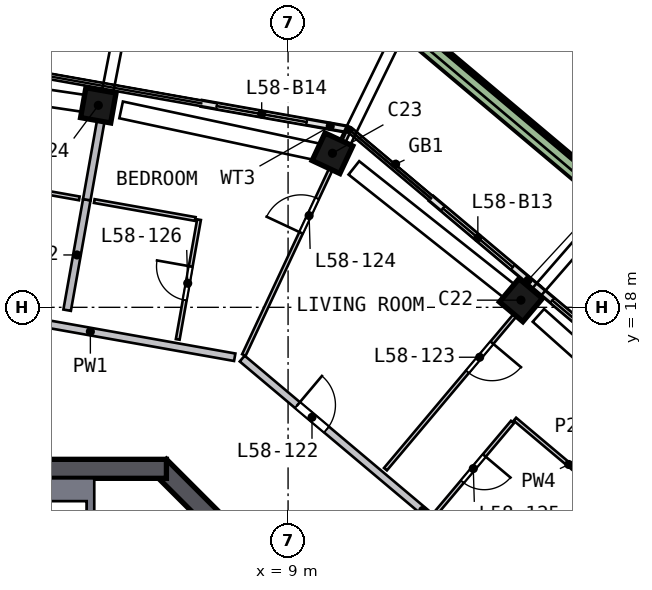
"""IFC4 building model, lengths in metres.
Left out: names, types, materials, properties, quantities, classifications, styles, units other than length and angle.
Written with IfcOpenShell. Run it as: python <this file> out.ifc"""

import sys

from ifc_helpers import new_model, si_unit, direction, frame, frame_2d, origin, origin_2d, place, context, subcontext, project, spatial, polyline, rectangle, outline, extrude, element, fill, save


model = new_model("IFC4")
c1 = context("Model", 3, precision=1e-05, world=origin(), true_north=direction((0.0, 1.0)))
c2 = subcontext(c1, "Body", "Model", "MODEL_VIEW")
j1 = project(units=[si_unit("LENGTHUNIT", "METRE"), si_unit("PLANEANGLEUNIT", "RADIAN")], contexts=[c1])
p1 = place(None, origin())
s1 = spatial("IfcSite", under=j1, at=p1, CompositionType="ELEMENT")
p2 = place(p1, origin())
s2 = spatial("IfcBuilding", under=s1, at=p2, CompositionType="ELEMENT")
p3 = place(p2, frame((0.0, 0.0, 237.5)))
s3 = spatial("IfcBuildingStorey", under=s2, at=p3, CompositionType="ELEMENT", Elevation=237.5)
p4 = place(p3, frame((15.233, 18.102, 0.0), z_axis=(-0.086770351, 0.071788967, 0.99363839), x_axis=(-0.760182292, 0.639875796, -0.112613711)))
e1 = element("IfcColumn", 1, at=p4, inside=s3, PredefinedType="COLUMN", context=c2, shape_type="SweptSolid", body=[
    extrude(rectangle(XDim=0.8, YDim=0.8, at=origin_2d()), origin(), (0.0, 0.0, 1.0), 3.21),
])
p5 = place(p3, frame((10.294, 21.996, 0.0), z_axis=(-0.104987311, 0.048046329, 0.993312244), x_axis=(0.899680967, -0.421003944, 0.115454914)))
e2 = element("IfcColumn", 2, at=p5, inside=s3, PredefinedType="COLUMN", context=c2, shape_type="SweptSolid", body=[
    extrude(rectangle(XDim=0.8, YDim=0.8, at=origin_2d()), origin(), (0.0, 0.0, 1.0), 3.211),
])
p6 = place(p3, frame((4.141, 23.293, 0.0), z_axis=(-0.111029677, 0.018783788, 0.993639562), x_axis=(-0.978276827, 0.174054393, -0.112603368)))
e3 = element("IfcColumn", 3, at=p6, inside=s3, PredefinedType="COLUMN", context=c2, shape_type="SweptSolid", body=[
    extrude(rectangle(XDim=0.8, YDim=0.8, at=origin_2d()), origin(), (0.0, 0.0, 1.0), 3.21),
])
p7 = place(p3, frame((13.823, 5.622, 0.0), z_axis=(0.0, 0.0, 1.0), x_axis=(-0.707106781, 0.707106781, 0.0)))
e4 = element("IfcWall", 4, at=p7, inside=s3, PredefinedType="SHEAR", context=c2, shape_type="SweptSolid", body=[
    extrude(rectangle(XDim=11.598, YDim=0.5, at=frame_2d((5.799, 0.0))), origin(), (0.0, 0.0, 1.0), 3.5),
])
p8 = place(p7, frame((2.099, 0.0, 0.0)))
e5 = element("IfcOpeningElement", 5, at=p8, cuts=e4, PredefinedType="OPENING", context=c2, shape_type="SweptSolid", body=[
    extrude(rectangle(XDim=1.2, YDim=2.1, at=frame_2d((0.6, 1.05))), frame((0.0, 0.26, 0.0), z_axis=(0.0, -1.0, 0.0), x_axis=(1.0, 0.0, 0.0)), (0.0, 0.0, 1.0), 0.52),
])
p9 = place(p3, frame((5.799, 13.75, 0.0), z_axis=(0.0, 0.0, 1.0), x_axis=(-1.0, 0.0, 0.0)))
e6 = element("IfcWall", 6, at=p9, inside=s3, PredefinedType="SHEAR", context=c2, shape_type="SweptSolid", body=[
    extrude(rectangle(XDim=11.598, YDim=0.5, at=frame_2d((5.799, 0.0))), origin(), (0.0, 0.0, 1.0), 3.5),
])
p10 = place(p9, frame((4.899, 0.0, 0.0)))
e7 = element("IfcOpeningElement", 7, at=p10, cuts=e6, PredefinedType="OPENING", context=c2, shape_type="SweptSolid", body=[
    extrude(rectangle(XDim=1.8, YDim=2.1, at=frame_2d((0.9, 1.05))), frame((0.0, 0.26, 0.0), z_axis=(0.0, -1.0, 0.0), x_axis=(1.0, 0.0, 0.0)), (0.0, 0.0, 1.0), 0.52),
])
p11 = place(p3, frame((18.095, 16.379, 0.0), z_axis=(0.0, 0.0, 1.0), x_axis=(-0.765168231, 0.643830395, 0.0)))
e8 = element("IfcWall", 8, at=p11, inside=s3, PredefinedType="SOLIDWALL", context=c2, shape_type="SweptSolid", body=[
    extrude(rectangle(XDim=3.3, YDim=0.15, at=frame_2d((1.65, 0.0))), origin(), (0.0, 0.0, 1.0), 2.525),
])
p12 = place(p11, frame((0.4, 0.0, 0.0)))
e9 = element("IfcOpeningElement", 9, at=p12, cuts=e8, PredefinedType="OPENING", context=c2, shape_type="SweptSolid", body=[
    extrude(rectangle(XDim=2.4, YDim=2.4, at=frame_2d((1.2, 1.2))), frame((0.0, 0.085, 0.0), z_axis=(0.0, -1.0, 0.0), x_axis=(1.0, 0.0, 0.0)), (0.0, 0.0, 1.0), 0.17),
])
p13 = place(p3, frame((15.571, 18.504, 0.0), z_axis=(0.0, 0.0, 1.0), x_axis=(-0.765118664, 0.643889299, 0.0)))
e10 = element("IfcWall", 10, at=p13, inside=s3, PredefinedType="SOLIDWALL", context=c2, shape_type="SweptSolid", body=[
    extrude(rectangle(XDim=3.661, YDim=0.15, at=frame_2d((1.831, 0.0))), origin(), (0.0, 0.0, 1.0), 2.525),
])
p14 = place(p13, frame((0.861, 0.0, 0.0)))
e11 = element("IfcOpeningElement", 11, at=p14, cuts=e10, PredefinedType="OPENING", context=c2, shape_type="SweptSolid", body=[
    extrude(rectangle(XDim=2.4, YDim=2.4, at=frame_2d((1.2, 1.2))), frame((0.0, 0.085, 0.0), z_axis=(0.0, -1.0, 0.0), x_axis=(1.0, 0.0, 0.0)), (0.0, 0.0, 1.0), 0.17),
])
p15 = place(p3, frame((10.534, 22.69, 0.0), z_axis=(0.0, 0.0, 1.0), x_axis=(-0.984569042, 0.174996577, 0.0)))
e12 = element("IfcWall", 12, at=p15, inside=s3, PredefinedType="SOLIDWALL", context=c2, shape_type="SweptSolid", body=[
    extrude(rectangle(XDim=3.863, YDim=0.15, at=frame_2d((1.932, 0.0))), origin(), (0.0, 0.0, 1.0), 2.525),
])
p16 = place(p15, frame((1.063, 0.0, 0.0)))
e13 = element("IfcOpeningElement", 13, at=p16, cuts=e12, PredefinedType="OPENING", context=c2, shape_type="SweptSolid", body=[
    extrude(rectangle(XDim=2.4, YDim=2.4, at=frame_2d((1.2, 1.2))), frame((0.0, 0.085, 0.0), z_axis=(0.0, -1.0, 0.0), x_axis=(1.0, 0.0, 0.0)), (0.0, 0.0, 1.0), 0.17),
])
p17 = place(p3, frame((22.109, 16.955, 0.0), z_axis=(0.0, 0.0, 1.0), x_axis=(-0.765151011, 0.64385086, 0.0)))
e14 = element("IfcWall", 14, at=p17, inside=s3, PredefinedType="SOLIDWALL", context=c2, shape_type="SweptSolid", body=[
    extrude(rectangle(XDim=13.223, YDim=0.5, at=frame_2d((6.612, 0.0))), origin(), (0.0, 0.0, 1.0), 0.7),
])
p18 = place(p3, origin())
e15 = element("IfcWall", 15, at=p18, inside=s3, PredefinedType="SOLIDWALL", context=c2, shape_type="SweptSolid", body=[
    extrude(outline(polyline([(3.9, 9.9), (3.7, 9.9), (3.7, 12.9), (1.4, 12.9), (1.4, 9.9), (1.2, 9.9), (1.2, 13.5), (3.9, 13.5), (3.9, 9.9)])), origin(), (0.0, 0.0, 1.0), 3.19),
])
p19 = place(p3, frame((-1.379, 18.282, 0.0), z_axis=(0.0, 0.0, 1.0), x_axis=(0.984561687, -0.17503795, 0.0)))
e16 = element("IfcWall", 16, at=p19, inside=s3, PredefinedType="SOLIDWALL", context=c2, shape_type="SweptSolid", body=[
    extrude(rectangle(XDim=9.116, YDim=0.2, at=frame_2d((4.558, 0.0))), origin(), (0.0, 0.0, 1.0), 3.19),
])
p20 = place(p19, frame((0.2, 0.0, 0.0)))
e17 = element("IfcOpeningElement", 17, at=p20, cuts=e16, PredefinedType="OPENING", context=c2, shape_type="SweptSolid", body=[
    extrude(rectangle(XDim=1.0, YDim=2.1, at=frame_2d((0.5, 1.05))), frame((0.0, 0.11, 0.0), z_axis=(0.0, -1.0, 0.0), x_axis=(1.0, 0.0, 0.0)), (0.0, 0.0, 1.0), 0.22),
])
p21 = place(p3, frame((7.793, 16.651, 0.0), z_axis=(0.0, 0.0, 1.0), x_axis=(0.765151702, -0.64385004, 0.0)))
e18 = element("IfcWall", 18, at=p21, inside=s3, PredefinedType="SOLIDWALL", context=c2, shape_type="SweptSolid", body=[
    extrude(rectangle(XDim=9.317, YDim=0.2, at=frame_2d((4.658, 0.0))), origin(), (0.0, 0.0, 1.0), 3.19),
])
p22 = place(p21, frame((1.9, 0.0, 0.0)))
e19 = element("IfcOpeningElement", 19, at=p22, cuts=e18, PredefinedType="OPENING", context=c2, shape_type="SweptSolid", body=[
    extrude(rectangle(XDim=1.0, YDim=2.1, at=frame_2d((0.5, 1.05))), frame((0.0, 0.11, 0.0), z_axis=(0.0, -1.0, 0.0), x_axis=(1.0, 0.0, 0.0)), (0.0, 0.0, 1.0), 0.22),
])
p23 = place(p3, frame((3.186, 17.925, 0.0), z_axis=(0.0, 0.0, 1.0), x_axis=(0.175035116, 0.984562191, 0.0)))
e20 = element("IfcWall", 20, at=p23, inside=s3, PredefinedType="SOLIDWALL", context=c2, shape_type="SweptSolid", body=[
    extrude(rectangle(XDim=2.953, YDim=0.2, at=frame_2d((1.477, 0.0))), origin(), (0.0, 0.0, 1.0), 3.19),
])
p24 = place(p3, frame((3.703, 20.832, 0.0), z_axis=(0.0, 0.0, 1.0), x_axis=(0.175045815, 0.984560289, 0.0)))
e21 = element("IfcWall", 21, at=p24, inside=s3, PredefinedType="SOLIDWALL", context=c2, shape_type="SweptSolid", body=[
    extrude(rectangle(XDim=2.95, YDim=0.2, at=frame_2d((1.475, 0.0))), origin(), (0.0, 0.0, 1.0), 3.19),
])
p25 = place(p3, frame((0.848, 21.339, 0.0), z_axis=(0.0, 0.0, 1.0), x_axis=(0.984559738, -0.175048917, 0.0)))
e22 = element("IfcWall", 22, at=p25, inside=s3, PredefinedType="PARTITIONING", context=c2, shape_type="SweptSolid", body=[
    extrude(rectangle(XDim=2.7, YDim=0.1, at=frame_2d((1.35, 0.0))), origin(), (0.0, 0.0, 1.0), 3.19),
])
p26 = place(p3, frame((6.558, 20.324, 0.0), z_axis=(0.0, 0.0, 1.0), x_axis=(-0.984572549, 0.174976844, 0.0)))
e23 = element("IfcWall", 23, at=p26, inside=s3, PredefinedType="PARTITIONING", context=c2, shape_type="SweptSolid", body=[
    extrude(rectangle(XDim=2.7, YDim=0.1, at=frame_2d((1.35, 0.0))), origin(), (0.0, 0.0, 1.0), 3.19),
])
p27 = place(p3, frame((6.097, 17.156, 0.0), z_axis=(0.0, 0.0, 1.0), x_axis=(0.175090855, 0.98455228, 0.0)))
e24 = element("IfcWall", 24, at=p27, inside=s3, PredefinedType="PARTITIONING", context=c2, shape_type="SweptSolid", body=[
    extrude(rectangle(XDim=3.2, YDim=0.1, at=frame_2d((1.6, 0.0))), origin(), (0.0, 0.0, 1.0), 3.19),
])
p28 = place(p27, frame((1.05, 0.0, 0.0)))
e25 = element("IfcOpeningElement", 25, at=p28, cuts=e24, PredefinedType="OPENING", context=c2, shape_type="SweptSolid", body=[
    extrude(rectangle(XDim=0.9, YDim=2.1, at=frame_2d((0.45, 1.05))), frame((0.0, 0.06, 0.0), z_axis=(0.0, -1.0, 0.0), x_axis=(1.0, 0.0, 0.0)), (0.0, 0.0, 1.0), 0.12),
])
p29 = place(p3, frame((7.837, 16.745, 0.0), z_axis=(0.0, 0.0, 1.0), x_axis=(0.423869701, 0.905723179, 0.0)))
e26 = element("IfcWall", 26, at=p29, inside=s3, PredefinedType="PARTITIONING", context=c2, shape_type="SweptSolid", body=[
    extrude(rectangle(XDim=6.476, YDim=0.1, at=frame_2d((3.238, 0.0))), origin(), (0.0, 0.0, 1.0), 3.19),
])
p30 = place(p29, frame((3.55, 0.0, 0.0)))
e27 = element("IfcOpeningElement", 27, at=p30, cuts=e26, PredefinedType="OPENING", context=c2, shape_type="SweptSolid", body=[
    extrude(rectangle(XDim=1.0, YDim=2.1, at=frame_2d((0.5, 1.05))), frame((0.0, 0.06, 0.0), z_axis=(0.0, -1.0, 0.0), x_axis=(1.0, 0.0, 0.0)), (0.0, 0.0, 1.0), 0.12),
])
p31 = place(p3, frame((15.522, 18.446, 0.0), z_axis=(0.0, 0.0, 1.0), x_axis=(-0.643863094, -0.765140716, 0.0)))
e28 = element("IfcWall", 28, at=p31, inside=s3, PredefinedType="PARTITIONING", context=c2, shape_type="SweptSolid", body=[
    extrude(rectangle(XDim=6.15, YDim=0.1, at=frame_2d((3.075, 0.0))), origin(), (0.0, 0.0, 1.0), 3.19),
])
p32 = place(p31, frame((1.8, 0.0, 0.0)))
e29 = element("IfcOpeningElement", 29, at=p32, cuts=e28, PredefinedType="OPENING", context=c2, shape_type="SweptSolid", body=[
    extrude(rectangle(XDim=1.0, YDim=2.1, at=frame_2d((0.5, 1.05))), frame((0.0, 0.06, 0.0), z_axis=(0.0, -1.0, 0.0), x_axis=(1.0, 0.0, 0.0)), (0.0, 0.0, 1.0), 0.12),
])
p33 = place(p3, frame((14.904, 14.981, 0.0), z_axis=(0.0, 0.0, 1.0), x_axis=(-0.643817992, -0.765178668, 0.0)))
e30 = element("IfcWall", 30, at=p33, inside=s3, PredefinedType="PARTITIONING", context=c2, shape_type="SweptSolid", body=[
    extrude(rectangle(XDim=3.1, YDim=0.1, at=frame_2d((1.55, 0.0))), origin(), (0.0, 0.0, 1.0), 3.19),
])
p34 = place(p33, frame((1.15, 0.0, 0.0)))
e31 = element("IfcOpeningElement", 31, at=p34, cuts=e30, PredefinedType="OPENING", context=c2, shape_type="SweptSolid", body=[
    extrude(rectangle(XDim=0.9, YDim=2.1, at=frame_2d((0.45, 1.05))), frame((0.0, 0.06, 0.0), z_axis=(0.0, -1.0, 0.0), x_axis=(1.0, 0.0, 0.0)), (0.0, 0.0, 1.0), 0.12),
])
p35 = place(p3, frame((17.802, 12.672, 0.0), z_axis=(0.0, 0.0, 1.0), x_axis=(-0.765170938, 0.643827179, 0.0)))
e32 = element("IfcWall", 32, at=p35, inside=s3, PredefinedType="PARTITIONING", context=c2, shape_type="SweptSolid", body=[
    extrude(rectangle(XDim=3.704, YDim=0.1, at=frame_2d((1.852, 0.0))), origin(), (0.0, 0.0, 1.0), 3.19),
])
p36 = place(p12, origin())
e33 = element("IfcDoor", 33, at=p36, inside=s3, OperationType="SLIDING_TO_RIGHT", PredefinedType="DOOR", context=c2, shape_type="SweptSolid", body=[
    extrude(rectangle(XDim=2.4, YDim=2.4, at=frame_2d((1.2, 1.2))), frame((0.0, 0.025, 0.0), z_axis=(0.0, -1.0, 0.0), x_axis=(1.0, 0.0, 0.0)), (0.0, 0.0, 1.0), 0.05),
])
fill(e9, e33)
p37 = place(p14, origin())
e34 = element("IfcDoor", 34, at=p37, inside=s3, OperationType="SLIDING_TO_LEFT", PredefinedType="DOOR", context=c2, shape_type="SweptSolid", body=[
    extrude(rectangle(XDim=2.4, YDim=2.4, at=frame_2d((1.2, 1.2))), frame((0.0, 0.025, 0.0), z_axis=(0.0, -1.0, 0.0), x_axis=(1.0, 0.0, 0.0)), (0.0, 0.0, 1.0), 0.05),
])
fill(e11, e34)
p38 = place(p16, origin())
e35 = element("IfcDoor", 35, at=p38, inside=s3, OperationType="SLIDING_TO_LEFT", PredefinedType="DOOR", context=c2, shape_type="SweptSolid", body=[
    extrude(rectangle(XDim=2.4, YDim=2.4, at=frame_2d((1.2, 1.2))), frame((0.0, 0.025, 0.0), z_axis=(0.0, -1.0, 0.0), x_axis=(1.0, 0.0, 0.0)), (0.0, 0.0, 1.0), 0.05),
])
fill(e13, e35)
p39 = place(p22, origin())
e36 = element("IfcDoor", 36, at=p39, inside=s3, OperationType="SINGLE_SWING_LEFT", PredefinedType="DOOR", context=c2, shape_type="SweptSolid", body=[
    extrude(rectangle(XDim=1.0, YDim=2.1, at=frame_2d((0.5, 1.05))), frame((0.0, 0.025, 0.0), z_axis=(0.0, -1.0, 0.0), x_axis=(1.0, 0.0, 0.0)), (0.0, 0.0, 1.0), 0.05),
])
fill(e19, e36)
p40 = place(p32, origin())
e37 = element("IfcDoor", 37, at=p40, inside=s3, OperationType="SINGLE_SWING_LEFT", PredefinedType="DOOR", context=c2, shape_type="SweptSolid", body=[
    extrude(rectangle(XDim=1.0, YDim=2.1, at=frame_2d((0.5, 1.05))), frame((0.0, 0.025, 0.0), z_axis=(0.0, -1.0, 0.0), x_axis=(1.0, 0.0, 0.0)), (0.0, 0.0, 1.0), 0.05),
])
fill(e29, e37)
p41 = place(p30, origin())
e38 = element("IfcDoor", 38, at=p41, inside=s3, OperationType="SINGLE_SWING_LEFT", PredefinedType="DOOR", context=c2, shape_type="SweptSolid", body=[
    extrude(rectangle(XDim=1.0, YDim=2.1, at=frame_2d((0.5, 1.05))), frame((0.0, 0.025, 0.0), z_axis=(0.0, -1.0, 0.0), x_axis=(1.0, 0.0, 0.0)), (0.0, 0.0, 1.0), 0.05),
])
fill(e27, e38)
p42 = place(p34, origin())
e39 = element("IfcDoor", 39, at=p42, inside=s3, OperationType="SINGLE_SWING_LEFT", PredefinedType="DOOR", context=c2, shape_type="SweptSolid", body=[
    extrude(rectangle(XDim=0.9, YDim=2.1, at=frame_2d((0.45, 1.05))), frame((0.0, 0.025, 0.0), z_axis=(0.0, -1.0, 0.0), x_axis=(1.0, 0.0, 0.0)), (0.0, 0.0, 1.0), 0.05),
])
fill(e31, e39)
p43 = place(p28, origin())
e40 = element("IfcDoor", 40, at=p43, inside=s3, OperationType="SINGLE_SWING_RIGHT", PredefinedType="DOOR", context=c2, shape_type="SweptSolid", body=[
    extrude(rectangle(XDim=0.9, YDim=2.1, at=frame_2d((0.45, 1.05))), frame((0.0, 0.025, 0.0), z_axis=(0.0, -1.0, 0.0), x_axis=(1.0, 0.0, 0.0)), (0.0, 0.0, 1.0), 0.05),
])
fill(e25, e40)
save(model, sys.argv[1])
